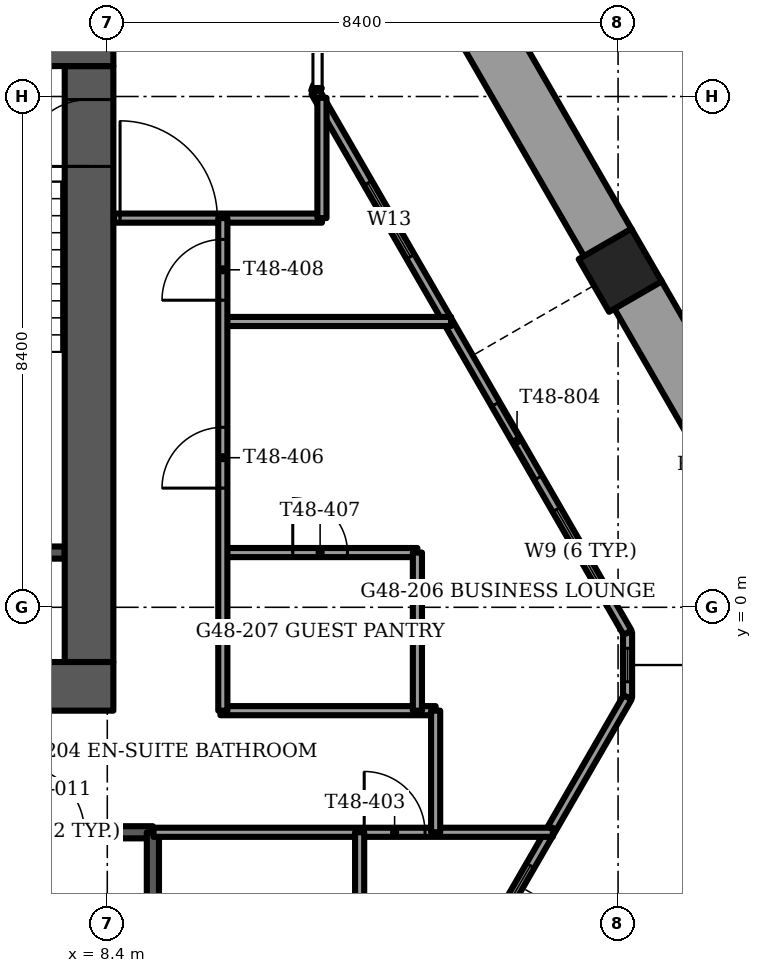
"""IFC4 building model, lengths in metres.
Left out: names, types, materials, properties, quantities, classifications, styles, units other than length and angle.
Written with IfcOpenShell. Run it as: python <this file> out.ifc"""

import sys

from ifc_helpers import new_model, si_unit, direction, frame, frame_2d, origin, origin_2d, place, context, subcontext, project, spatial, rectangle, extrude, element, fill, save


model = new_model("IFC4")
c1 = context("Model", 3, precision=1e-05, world=origin(), true_north=direction((0.0, 1.0)))
c2 = subcontext(c1, "Body", "Model", "MODEL_VIEW")
j1 = project(units=[si_unit("LENGTHUNIT", "METRE"), si_unit("PLANEANGLEUNIT", "RADIAN")], contexts=[c1])
p1 = place(None, origin())
s1 = spatial("IfcSite", under=j1, at=p1, CompositionType="ELEMENT")
p2 = place(p1, origin())
s2 = spatial("IfcBuilding", under=s1, at=p2, CompositionType="ELEMENT")
p3 = place(p2, frame((0.0, 0.0, 194.5)))
s3 = spatial("IfcBuildingStorey", under=s2, at=p3, CompositionType="ELEMENT", Elevation=194.5)
p4 = place(p3, frame((16.835, 5.542, -1.2), z_axis=(0.0, 0.0, 1.0), x_axis=(0.5, -0.866025403784, 0.0)))
e1 = element("IfcColumn", 1, at=p4, inside=s3, PredefinedType="COLUMN", context=c2, shape_type="SweptSolid", body=[
    extrude(rectangle(XDim=1.0, YDim=1.0, at=origin_2d()), origin(), (0.0, 0.0, 1.0), 3.75),
])
p5 = place(p3, frame((-8.5, -1.3, -0.3), z_axis=(0.0, 0.0, 1.0), x_axis=(1.0, 0.0, 0.0)))
e2 = element("IfcWall", 2, at=p5, inside=s3, PredefinedType="SHEAR", context=c2, shape_type="SweptSolid", body=[
    extrude(rectangle(XDim=17.0, YDim=0.8, at=frame_2d((8.5, 0.0))), origin(), (0.0, 0.0, 1.0), 3.75),
])
p6 = place(p5, frame((7.7, 0.0, 0.0)))
e3 = element("IfcOpeningElement", 3, at=p6, cuts=e2, PredefinedType="OPENING", context=c2, shape_type="SweptSolid", body=[
    extrude(rectangle(XDim=1.6, YDim=2.1, at=frame_2d((0.8, 1.05))), frame((0.0, 0.4, 0.0), z_axis=(0.0, -1.0, 0.0), x_axis=(1.0, 0.0, 0.0)), (0.0, 0.0, 1.0), 0.8),
])
p7 = place(p3, frame((-8.5, 9.3, -0.3), z_axis=(0.0, 0.0, 1.0), x_axis=(1.0, 0.0, 0.0)))
e4 = element("IfcWall", 4, at=p7, inside=s3, PredefinedType="SHEAR", context=c2, shape_type="SweptSolid", body=[
    extrude(rectangle(XDim=17.0, YDim=0.8, at=frame_2d((8.5, 0.0))), origin(), (0.0, 0.0, 1.0), 3.75),
])
p8 = place(p7, frame((7.7, 0.0, 0.0)))
e5 = element("IfcOpeningElement", 5, at=p8, cuts=e4, PredefinedType="OPENING", context=c2, shape_type="SweptSolid", body=[
    extrude(rectangle(XDim=1.6, YDim=2.1, at=frame_2d((0.8, 1.05))), frame((0.0, 0.4, 0.0), z_axis=(0.0, -1.0, 0.0), x_axis=(1.0, 0.0, 0.0)), (0.0, 0.0, 1.0), 0.8),
])
p9 = place(p7, frame((1.75, 0.0, 0.0)))
e6 = element("IfcOpeningElement", 6, at=p9, cuts=e4, PredefinedType="OPENING", context=c2, shape_type="SweptSolid", body=[
    extrude(rectangle(XDim=1.1, YDim=2.1, at=frame_2d((0.55, 1.05))), frame((0.0, 0.4, 0.0), z_axis=(0.0, -1.0, 0.0), x_axis=(1.0, 0.0, 0.0)), (0.0, 0.0, 1.0), 0.8),
])
p10 = place(p7, frame((14.15, 0.0, 0.0)))
e7 = element("IfcOpeningElement", 7, at=p10, cuts=e4, PredefinedType="OPENING", context=c2, shape_type="SweptSolid", body=[
    extrude(rectangle(XDim=1.1, YDim=2.1, at=frame_2d((0.55, 1.05))), frame((0.0, 0.4, 0.0), z_axis=(0.0, -1.0, 0.0), x_axis=(1.0, 0.0, 0.0)), (0.0, 0.0, 1.0), 0.8),
])
p11 = place(p3, frame((8.1, -0.9, -0.3), z_axis=(0.0, 0.0, 1.0), x_axis=(0.0, 1.0, 0.0)))
e8 = element("IfcWall", 8, at=p11, inside=s3, PredefinedType="SHEAR", context=c2, shape_type="SweptSolid", body=[
    extrude(rectangle(XDim=9.8, YDim=0.8, at=frame_2d((4.9, 0.0))), origin(), (0.0, 0.0, 1.0), 3.75),
])
p12 = place(p11, frame((8.15, 0.0, 0.0)))
e9 = element("IfcOpeningElement", 9, at=p12, cuts=e8, PredefinedType="OPENING", context=c2, shape_type="SweptSolid", body=[
    extrude(rectangle(XDim=1.1, YDim=2.1, at=frame_2d((0.55, 1.05))), frame((0.0, 0.4, 0.0), z_axis=(0.0, -1.0, 0.0), x_axis=(1.0, 0.0, 0.0)), (0.0, 0.0, 1.0), 0.8),
])
p13 = place(p3, frame((17.936, -5.635, 0.0), z_axis=(0.0, 0.0, 1.0), x_axis=(0.500033586455, 0.866006011767, 0.0)))
e10 = element("IfcWall", 10, at=p13, inside=s3, PredefinedType="PARAPET", context=c2, shape_type="SweptSolid", body=[
    extrude(rectangle(XDim=4.868, YDim=0.9, at=frame_2d((2.434, 0.0))), origin(), (0.0, 0.0, 1.0), 1.1),
])
p14 = place(p3, frame((20.37, -0.479, 0.0), z_axis=(0.0, 0.0, 1.0), x_axis=(-0.500022104698, 0.866012641255, 0.0)))
e11 = element("IfcWall", 11, at=p14, inside=s3, PredefinedType="PARAPET", context=c2, shape_type="SweptSolid", body=[
    extrude(rectangle(XDim=6.512, YDim=0.9, at=frame_2d((3.256, 0.0))), origin(), (0.0, 0.0, 1.0), 1.1),
])
p15 = place(p3, frame((16.644, 5.974, 0.0), z_axis=(0.0, 0.0, 1.0), x_axis=(-0.499984268907, 0.866034485945, 0.0)))
e12 = element("IfcWall", 12, at=p15, inside=s3, PredefinedType="PARAPET", context=c2, shape_type="SweptSolid", body=[
    extrude(rectangle(XDim=6.296, YDim=0.9, at=frame_2d((3.148, 0.0))), origin(), (0.0, 0.0, 1.0), 1.1),
])
p16 = place(p3, frame((11.824, -10.37, 0.0), z_axis=(0.0, 0.0, 1.0), x_axis=(0.499996992154, 0.866027140358, 0.0)))
e13 = element("IfcWall", 13, at=p16, inside=s3, PredefinedType="SOLIDWALL", context=c2, shape_type="SweptSolid", body=[
    extrude(rectangle(XDim=10.264, YDim=0.15, at=frame_2d((5.132, 0.0))), origin(), (0.0, 0.0, 1.0), 3.45),
])
p17 = place(p16, frame((1.269, 0.0, 0.15)))
e14 = element("IfcOpeningElement", 14, at=p17, cuts=e13, PredefinedType="OPENING", context=c2, shape_type="SweptSolid", body=[
    extrude(rectangle(XDim=1.6, YDim=2.2, at=frame_2d((0.8, 1.1))), frame((0.0, 0.075, 0.0), z_axis=(0.0, -1.0, 0.0), x_axis=(1.0, 0.0, 0.0)), (0.0, 0.0, 1.0), 0.15),
])
p18 = place(p16, frame((3.469, 0.0, 0.0)))
e15 = element("IfcOpeningElement", 15, at=p18, cuts=e13, PredefinedType="OPENING", context=c2, shape_type="SweptSolid", body=[
    extrude(rectangle(XDim=1.4, YDim=2.4, at=frame_2d((0.7, 1.2))), frame((0.0, 0.075, 0.0), z_axis=(0.0, -1.0, 0.0), x_axis=(1.0, 0.0, 0.0)), (0.0, 0.0, 1.0), 0.15),
])
p19 = place(p16, frame((5.469, 0.0, 0.15)))
e16 = element("IfcOpeningElement", 16, at=p19, cuts=e13, PredefinedType="OPENING", context=c2, shape_type="SweptSolid", body=[
    extrude(rectangle(XDim=1.6, YDim=2.2, at=frame_2d((0.8, 1.1))), frame((0.0, 0.075, 0.0), z_axis=(0.0, -1.0, 0.0), x_axis=(1.0, 0.0, 0.0)), (0.0, 0.0, 1.0), 0.15),
])
p20 = place(p3, frame((16.956, -0.417, 0.0), z_axis=(0.0, 0.0, 1.0), x_axis=(-0.499996992154, 0.866027140358, 0.0)))
e17 = element("IfcWall", 17, at=p20, inside=s3, PredefinedType="SOLIDWALL", context=c2, shape_type="SweptSolid", body=[
    extrude(rectangle(XDim=10.264, YDim=0.15, at=frame_2d((5.132, 0.0))), origin(), (0.0, 0.0, 1.0), 3.45),
])
p21 = place(p20, frame((0.739, 0.0, 0.15)))
e18 = element("IfcOpeningElement", 18, at=p21, cuts=e17, PredefinedType="OPENING", context=c2, shape_type="SweptSolid", body=[
    extrude(rectangle(XDim=1.6, YDim=2.2, at=frame_2d((0.8, 1.1))), frame((0.0, 0.075, 0.0), z_axis=(0.0, -1.0, 0.0), x_axis=(1.0, 0.0, 0.0)), (0.0, 0.0, 1.0), 0.15),
])
p22 = place(p20, frame((2.939, 0.0, 0.0)))
e19 = element("IfcOpeningElement", 19, at=p22, cuts=e17, PredefinedType="OPENING", context=c2, shape_type="SweptSolid", body=[
    extrude(rectangle(XDim=1.4, YDim=2.4, at=frame_2d((0.7, 1.2))), frame((0.0, 0.075, 0.0), z_axis=(0.0, -1.0, 0.0), x_axis=(1.0, 0.0, 0.0)), (0.0, 0.0, 1.0), 0.15),
])
p23 = place(p20, frame((7.139, 0.0, 0.15)))
e20 = element("IfcOpeningElement", 20, at=p23, cuts=e17, PredefinedType="OPENING", context=c2, shape_type="SweptSolid", body=[
    extrude(rectangle(XDim=1.4, YDim=2.2, at=frame_2d((0.7, 1.1))), frame((0.0, 0.075, 0.0), z_axis=(0.0, -1.0, 0.0), x_axis=(1.0, 0.0, 0.0)), (0.0, 0.0, 1.0), 0.15),
])
p24 = place(p3, frame((16.956, -1.482, 0.0), z_axis=(0.0, 0.0, 1.0), x_axis=(0.0, 1.0, 0.0)))
e21 = element("IfcWall", 21, at=p24, inside=s3, PredefinedType="SOLIDWALL", context=c2, shape_type="SweptSolid", body=[
    extrude(rectangle(XDim=1.065, YDim=0.15, at=frame_2d((0.532, 0.0))), origin(), (0.0, 0.0, 1.0), 3.45),
])
p25 = place(p24, frame((0.258, 0.0, 0.15)))
e22 = element("IfcOpeningElement", 22, at=p25, cuts=e21, PredefinedType="OPENING", context=c2, shape_type="SweptSolid", body=[
    extrude(rectangle(XDim=0.55, YDim=2.2, at=frame_2d((0.275, 1.1))), frame((0.0, 0.075, 0.0), z_axis=(0.0, -1.0, 0.0), x_axis=(1.0, 0.0, 0.0)), (0.0, 0.0, 1.0), 0.15),
])
p26 = place(p3, frame((11.824, 8.472, 0.0), z_axis=(0.0, 0.0, 1.0), x_axis=(0.337751931921, 0.941235163221, 0.0)))
e23 = element("IfcWall", 23, at=p26, inside=s3, PredefinedType="SOLIDWALL", context=c2, shape_type="SweptSolid", body=[
    extrude(rectangle(XDim=0.098, YDim=0.15, at=frame_2d((0.049, 0.0))), origin(), (0.0, 0.0, 1.0), 3.45),
])
p27 = place(p3, frame((4.45, 0.9, -0.3), z_axis=(0.0, 0.0, 1.0), x_axis=(1.0, 0.0, 0.0)))
e24 = element("IfcWall", 24, at=p27, inside=s3, PredefinedType="SOLIDWALL", context=c2, shape_type="SweptSolid", body=[
    extrude(rectangle(XDim=3.25, YDim=0.2, at=frame_2d((1.625, 0.0))), origin(), (0.0, 0.0, 1.0), 3.75),
])
p28 = place(p3, frame((5.8, -3.7, -0.3), z_axis=(0.0, 0.0, 1.0), x_axis=(1.0, 0.0, 0.0)))
e25 = element("IfcWall", 25, at=p28, inside=s3, PredefinedType="SOLIDWALL", context=c2, shape_type="SweptSolid", body=[
    extrude(rectangle(XDim=3.35, YDim=0.2, at=frame_2d((1.675, 0.0))), origin(), (0.0, 0.0, 1.0), 3.75),
])
p29 = place(p28, frame((1.125, 0.0, 0.0)))
e26 = element("IfcOpeningElement", 26, at=p29, cuts=e25, PredefinedType="OPENING", context=c2, shape_type="SweptSolid", body=[
    extrude(rectangle(XDim=1.1, YDim=2.1, at=frame_2d((0.55, 1.05))), frame((0.0, 0.1, 0.0), z_axis=(0.0, -1.0, 0.0), x_axis=(1.0, 0.0, 0.0)), (0.0, 0.0, 1.0), 0.2),
])
p30 = place(p3, frame((9.15, -3.7, -0.3), z_axis=(0.0, 0.0, 1.0), x_axis=(0.0, -1.0, 0.0)))
e27 = element("IfcWall", 27, at=p30, inside=s3, PredefinedType="SOLIDWALL", context=c2, shape_type="SweptSolid", body=[
    extrude(rectangle(XDim=7.7, YDim=0.2, at=frame_2d((3.85, 0.0))), origin(), (0.0, 0.0, 1.0), 3.75),
])
p31 = place(p3, frame((9.16, -3.7, 0.0), z_axis=(0.0, 0.0, 1.0), x_axis=(1.0, 0.0, 0.0)))
e28 = element("IfcWall", 28, at=p31, inside=s3, PredefinedType="PARTITIONING", context=c2, shape_type="SweptSolid", body=[
    extrude(rectangle(XDim=6.567, YDim=0.15, at=frame_2d((3.284, 0.0))), origin(), (0.0, 0.0, 1.0), 3.45),
])
p32 = place(p31, frame((3.465, 0.0, 0.0)))
e29 = element("IfcOpeningElement", 29, at=p32, cuts=e28, PredefinedType="OPENING", context=c2, shape_type="SweptSolid", body=[
    extrude(rectangle(XDim=1.0, YDim=2.1, at=frame_2d((0.5, 1.05))), frame((0.0, 0.075, 0.0), z_axis=(0.0, -1.0, 0.0), x_axis=(1.0, 0.0, 0.0)), (0.0, 0.0, 1.0), 0.15),
])
p33 = place(p3, frame((10.26, -1.7, 0.0), z_axis=(0.0, 0.0, 1.0), x_axis=(1.0, 0.0, 0.0)))
e30 = element("IfcWall", 30, at=p33, inside=s3, PredefinedType="PARTITIONING", context=c2, shape_type="SweptSolid", body=[
    extrude(rectangle(XDim=3.54, YDim=0.15, at=frame_2d((1.77, 0.0))), origin(), (0.0, 0.0, 1.0), 3.45),
])
p34 = place(p3, frame((10.3, 0.9, 0.0), z_axis=(0.0, 0.0, 1.0), x_axis=(1.0, 0.0, 0.0)))
e31 = element("IfcWall", 31, at=p34, inside=s3, PredefinedType="PARTITIONING", context=c2, shape_type="SweptSolid", body=[
    extrude(rectangle(XDim=3.2, YDim=0.15, at=frame_2d((1.6, 0.0))), origin(), (0.0, 0.0, 1.0), 3.45),
])
p35 = place(p34, frame((1.15, 0.0, 0.0)))
e32 = element("IfcOpeningElement", 32, at=p35, cuts=e31, PredefinedType="OPENING", context=c2, shape_type="SweptSolid", body=[
    extrude(rectangle(XDim=0.9, YDim=2.1, at=frame_2d((0.45, 1.05))), frame((0.0, 0.075, 0.0), z_axis=(0.0, -1.0, 0.0), x_axis=(1.0, 0.0, 0.0)), (0.0, 0.0, 1.0), 0.15),
])
p36 = place(p3, frame((10.3, 4.7, 0.0), z_axis=(0.0, 0.0, 1.0), x_axis=(1.0, 0.0, 0.0)))
e33 = element("IfcWall", 33, at=p36, inside=s3, PredefinedType="PARTITIONING", context=c2, shape_type="SweptSolid", body=[
    extrude(rectangle(XDim=3.754, YDim=0.15, at=frame_2d((1.877, 0.0))), origin(), (0.0, 0.0, 1.0), 3.45),
])
p37 = place(p3, frame((8.51, 6.4, 0.0), z_axis=(0.0, 0.0, 1.0), x_axis=(1.0, 0.0, 0.0)))
e34 = element("IfcWall", 34, at=p37, inside=s3, PredefinedType="PARTITIONING", context=c2, shape_type="SweptSolid", body=[
    extrude(rectangle(XDim=3.42, YDim=0.15, at=frame_2d((1.71, 0.0))), origin(), (0.0, 0.0, 1.0), 3.45),
])
p38 = place(p37, frame((0.1, 0.0, 0.0)))
e35 = element("IfcOpeningElement", 35, at=p38, cuts=e34, PredefinedType="OPENING", context=c2, shape_type="SweptSolid", body=[
    extrude(rectangle(XDim=1.6, YDim=2.1, at=frame_2d((0.8, 1.05))), frame((0.0, 0.075, 0.0), z_axis=(0.0, -1.0, 0.0), x_axis=(1.0, 0.0, 0.0)), (0.0, 0.0, 1.0), 0.15),
])
p39 = place(p3, frame((13.8, -3.7, 0.0), z_axis=(0.0, 0.0, 1.0), x_axis=(0.0, 1.0, 0.0)))
e36 = element("IfcWall", 36, at=p39, inside=s3, PredefinedType="PARTITIONING", context=c2, shape_type="SweptSolid", body=[
    extrude(rectangle(XDim=2.0, YDim=0.15, at=frame_2d((1.0, 0.0))), origin(), (0.0, 0.0, 1.0), 3.45),
])
p40 = place(p3, frame((13.5, -1.7, 0.0), z_axis=(0.0, 0.0, 1.0), x_axis=(0.0, 1.0, 0.0)))
e37 = element("IfcWall", 37, at=p40, inside=s3, PredefinedType="PARTITIONING", context=c2, shape_type="SweptSolid", body=[
    extrude(rectangle(XDim=2.6, YDim=0.15, at=frame_2d((1.3, 0.0))), origin(), (0.0, 0.0, 1.0), 3.45),
])
p41 = place(p3, frame((12.55, -6.7, 0.0), z_axis=(0.0, 0.0, 1.0), x_axis=(0.0, 1.0, 0.0)))
e38 = element("IfcWall", 38, at=p41, inside=s3, PredefinedType="PARTITIONING", context=c2, shape_type="SweptSolid", body=[
    extrude(rectangle(XDim=3.0, YDim=0.15, at=frame_2d((1.5, 0.0))), origin(), (0.0, 0.0, 1.0), 3.45),
])
p42 = place(p41, frame((1.1, 0.0, 0.0)))
e39 = element("IfcOpeningElement", 39, at=p42, cuts=e38, PredefinedType="OPENING", context=c2, shape_type="SweptSolid", body=[
    extrude(rectangle(XDim=0.8, YDim=2.1, at=frame_2d((0.4, 1.05))), frame((0.0, 0.075, 0.0), z_axis=(0.0, -1.0, 0.0), x_axis=(1.0, 0.0, 0.0)), (0.0, 0.0, 1.0), 0.15),
])
p43 = place(p3, frame((11.93, 6.4, 0.0), z_axis=(0.0, 0.0, 1.0), x_axis=(0.0, 1.0, 0.0)))
e40 = element("IfcWall", 40, at=p43, inside=s3, PredefinedType="PARTITIONING", context=c2, shape_type="SweptSolid", body=[
    extrude(rectangle(XDim=1.978, YDim=0.15, at=frame_2d((0.989, 0.0))), origin(), (0.0, 0.0, 1.0), 3.45),
])
p44 = place(p3, frame((10.3, -1.7, 0.0), z_axis=(0.0, 0.0, 1.0), x_axis=(0.0, 1.0, 0.0)))
e41 = element("IfcWall", 41, at=p44, inside=s3, PredefinedType="PARTITIONING", context=c2, shape_type="SweptSolid", body=[
    extrude(rectangle(XDim=8.1, YDim=0.15, at=frame_2d((4.05, 0.0))), origin(), (0.0, 0.0, 1.0), 3.45),
])
p45 = place(p44, frame((3.66, 0.0, 0.0)))
e42 = element("IfcOpeningElement", 42, at=p45, cuts=e41, PredefinedType="OPENING", context=c2, shape_type="SweptSolid", body=[
    extrude(rectangle(XDim=1.0, YDim=2.1, at=frame_2d((0.5, 1.05))), frame((0.0, 0.075, 0.0), z_axis=(0.0, -1.0, 0.0), x_axis=(1.0, 0.0, 0.0)), (0.0, 0.0, 1.0), 0.15),
])
p46 = place(p44, frame((6.75, 0.0, 0.0)))
e43 = element("IfcOpeningElement", 43, at=p46, cuts=e41, PredefinedType="OPENING", context=c2, shape_type="SweptSolid", body=[
    extrude(rectangle(XDim=1.0, YDim=2.1, at=frame_2d((0.5, 1.05))), frame((0.0, 0.075, 0.0), z_axis=(0.0, -1.0, 0.0), x_axis=(1.0, 0.0, 0.0)), (0.0, 0.0, 1.0), 0.15),
])
p47 = place(p19, origin())
e44 = element("IfcWindow", 44, at=p47, inside=s3, PartitioningType="SINGLE_PANEL", PredefinedType="WINDOW", context=c2, shape_type="SweptSolid", body=[
    extrude(rectangle(XDim=1.6, YDim=2.2, at=frame_2d((0.8, 1.1))), frame((0.0, 0.03, 0.0), z_axis=(0.0, -1.0, 0.0), x_axis=(1.0, 0.0, 0.0)), (0.0, 0.0, 1.0), 0.06),
])
fill(e16, e44)
p48 = place(p21, origin())
e45 = element("IfcWindow", 45, at=p48, inside=s3, PartitioningType="SINGLE_PANEL", PredefinedType="WINDOW", context=c2, shape_type="SweptSolid", body=[
    extrude(rectangle(XDim=1.6, YDim=2.2, at=frame_2d((0.8, 1.1))), frame((0.0, 0.03, 0.0), z_axis=(0.0, -1.0, 0.0), x_axis=(1.0, 0.0, 0.0)), (0.0, 0.0, 1.0), 0.06),
])
fill(e18, e45)
p49 = place(p22, origin())
e46 = element("IfcDoor", 46, at=p49, inside=s3, OperationType="SLIDING_TO_LEFT", PredefinedType="DOOR", context=c2, shape_type="SweptSolid", body=[
    extrude(rectangle(XDim=1.4, YDim=2.4, at=frame_2d((0.7, 1.2))), frame((0.0, 0.025, 0.0), z_axis=(0.0, -1.0, 0.0), x_axis=(1.0, 0.0, 0.0)), (0.0, 0.0, 1.0), 0.05),
])
fill(e19, e46)
p50 = place(p23, origin())
e47 = element("IfcWindow", 47, at=p50, inside=s3, PartitioningType="SINGLE_PANEL", PredefinedType="WINDOW", context=c2, shape_type="SweptSolid", body=[
    extrude(rectangle(XDim=1.4, YDim=2.2, at=frame_2d((0.7, 1.1))), frame((0.0, 0.03, 0.0), z_axis=(0.0, -1.0, 0.0), x_axis=(1.0, 0.0, 0.0)), (0.0, 0.0, 1.0), 0.06),
])
fill(e20, e47)
p51 = place(p25, origin())
e48 = element("IfcWindow", 48, at=p51, inside=s3, PartitioningType="SINGLE_PANEL", PredefinedType="WINDOW", context=c2, shape_type="SweptSolid", body=[
    extrude(rectangle(XDim=0.55, YDim=2.2, at=frame_2d((0.275, 1.1))), frame((0.0, 0.03, 0.0), z_axis=(0.0, -1.0, 0.0), x_axis=(1.0, 0.0, 0.0)), (0.0, 0.0, 1.0), 0.06),
])
fill(e22, e48)
p52 = place(p12, origin())
e49 = element("IfcDoor", 49, at=p52, inside=s3, OperationType="SINGLE_SWING_LEFT", PredefinedType="DOOR", context=c2, shape_type="SweptSolid", body=[
    extrude(rectangle(XDim=1.1, YDim=2.1, at=frame_2d((0.55, 1.05))), frame((0.0, 0.025, 0.0), z_axis=(0.0, -1.0, 0.0), x_axis=(1.0, 0.0, 0.0)), (0.0, 0.0, 1.0), 0.05),
])
fill(e9, e49)
p53 = place(p29, origin())
e50 = element("IfcDoor", 50, at=p53, inside=s3, OperationType="SINGLE_SWING_LEFT", PredefinedType="DOOR", context=c2, shape_type="SweptSolid", body=[
    extrude(rectangle(XDim=1.1, YDim=2.1, at=frame_2d((0.55, 1.05))), frame((0.0, 0.025, 0.0), z_axis=(0.0, -1.0, 0.0), x_axis=(1.0, 0.0, 0.0)), (0.0, 0.0, 1.0), 0.05),
])
fill(e26, e50)
p54 = place(p32, origin())
e51 = element("IfcDoor", 51, at=p54, inside=s3, OperationType="SINGLE_SWING_RIGHT", PredefinedType="DOOR", context=c2, shape_type="SweptSolid", body=[
    extrude(rectangle(XDim=1.0, YDim=2.1, at=frame_2d((0.5, 1.05))), frame((0.0, 0.025, 0.0), z_axis=(0.0, -1.0, 0.0), x_axis=(1.0, 0.0, 0.0)), (0.0, 0.0, 1.0), 0.05),
])
fill(e29, e51)
p55 = place(p45, origin())
e52 = element("IfcDoor", 52, at=p55, inside=s3, OperationType="SINGLE_SWING_RIGHT", PredefinedType="DOOR", context=c2, shape_type="SweptSolid", body=[
    extrude(rectangle(XDim=1.0, YDim=2.1, at=frame_2d((0.5, 1.05))), frame((0.0, 0.025, 0.0), z_axis=(0.0, -1.0, 0.0), x_axis=(1.0, 0.0, 0.0)), (0.0, 0.0, 1.0), 0.05),
])
fill(e42, e52)
p56 = place(p35, origin())
e53 = element("IfcDoor", 53, at=p56, inside=s3, OperationType="SINGLE_SWING_LEFT", PredefinedType="DOOR", context=c2, shape_type="SweptSolid", body=[
    extrude(rectangle(XDim=0.9, YDim=2.1, at=frame_2d((0.45, 1.05))), frame((0.0, 0.025, 0.0), z_axis=(0.0, -1.0, 0.0), x_axis=(1.0, 0.0, 0.0)), (0.0, 0.0, 1.0), 0.05),
])
fill(e32, e53)
p57 = place(p46, origin())
e54 = element("IfcDoor", 54, at=p57, inside=s3, OperationType="SINGLE_SWING_LEFT", PredefinedType="DOOR", context=c2, shape_type="SweptSolid", body=[
    extrude(rectangle(XDim=1.0, YDim=2.1, at=frame_2d((0.5, 1.05))), frame((0.0, 0.025, 0.0), z_axis=(0.0, -1.0, 0.0), x_axis=(1.0, 0.0, 0.0)), (0.0, 0.0, 1.0), 0.05),
])
fill(e43, e54)
p58 = place(p38, origin())
e55 = element("IfcDoor", 55, at=p58, inside=s3, OperationType="DOUBLE_DOOR_SINGLE_SWING", PredefinedType="DOOR", context=c2, shape_type="SweptSolid", body=[
    extrude(rectangle(XDim=1.6, YDim=2.1, at=frame_2d((0.8, 1.05))), frame((0.0, 0.025, 0.0), z_axis=(0.0, -1.0, 0.0), x_axis=(1.0, 0.0, 0.0)), (0.0, 0.0, 1.0), 0.05),
])
fill(e35, e55)
save(model, sys.argv[1])
